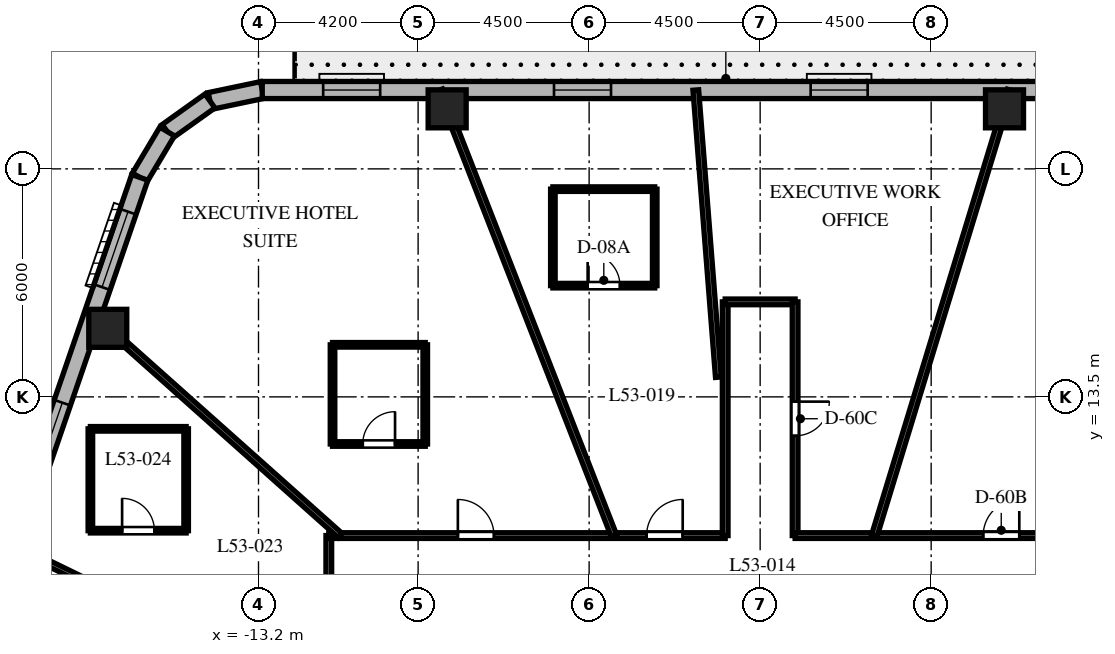
"""IFC4 building model, lengths in metres.
Left out: names, types, materials, properties, quantities, classifications, styles, units other than length and angle.
Written with IfcOpenShell. Run it as: python <this file> out.ifc"""

import sys

from ifc_helpers import new_model, si_unit, direction, frame, frame_2d, origin, origin_2d, place, context, subcontext, project, spatial, rectangle, extrude, element, fill, save


model = new_model("IFC4")
c1 = context("Model", 3, precision=1e-05, world=origin(), true_north=direction((0.0, 1.0)))
c2 = subcontext(c1, "Body", "Model", "MODEL_VIEW")
j1 = project(units=[si_unit("LENGTHUNIT", "METRE"), si_unit("PLANEANGLEUNIT", "RADIAN")], contexts=[c1])
p1 = place(None, origin())
s1 = spatial("IfcSite", under=j1, at=p1, CompositionType="ELEMENT")
p2 = place(p1, origin())
s2 = spatial("IfcBuilding", under=s1, at=p2, CompositionType="ELEMENT")
p3 = place(p2, frame((0.0, 0.0, 214.1)))
s3 = spatial("IfcBuildingStorey", under=s2, at=p3, CompositionType="ELEMENT", Elevation=214.1)
for number, where, z_axis, x_axis in (
    (1, (6.43, 21.08, 0.0), (0.0, 0.0, 1.0), (1.0, 0.0, 0.0)),
    (2, (-8.236, 21.08, 0.0), (0.0, 0.0, 1.0), (1.0, 0.0, 0.0)),
    (3, (-17.166, 15.304, 0.0), (0.0, 0.0, 1.0), (1.0, 0.0, 0.0)),
):
    element("IfcColumn", number, at=place(p3, frame(where, z_axis=z_axis, x_axis=x_axis)), inside=s3, PredefinedType="COLUMN", context=c2, shape_type="SweptSolid", body=[
        extrude(rectangle(XDim=1.0, YDim=1.0, at=origin_2d()), origin(), (0.0, 0.0, 1.0), 3.8),
    ])
p4 = place(p3, frame((-13.102, 21.575, 0.0), z_axis=(0.0, 0.0, 1.0), x_axis=(-0.978757421505, -0.205021730188, 0.0)))
e4 = element("IfcWall", 4, at=p4, inside=s3, PredefinedType="SOLIDWALL", context=c2, shape_type="SweptSolid", body=[
    extrude(rectangle(XDim=1.406, YDim=0.45, at=frame_2d((0.703, 0.0))), origin(), (0.0, 0.0, 1.0), 3.5),
])
p5 = place(p3, frame((-14.478, 21.287, 0.0), z_axis=(0.0, 0.0, 1.0), x_axis=(-0.813888518617, -0.58102106611, 0.0)))
e5 = element("IfcWall", 5, at=p5, inside=s3, PredefinedType="SOLIDWALL", context=c2, shape_type="SweptSolid", body=[
    extrude(rectangle(XDim=1.383, YDim=0.45, at=frame_2d((0.691, 0.0))), origin(), (0.0, 0.0, 1.0), 3.5),
])
p6 = place(p3, frame((-15.604, 20.483, 0.0), z_axis=(0.0, 0.0, 1.0), x_axis=(-0.512222149036, -0.858852996756, 0.0)))
e6 = element("IfcWall", 6, at=p6, inside=s3, PredefinedType="SOLIDWALL", context=c2, shape_type="SweptSolid", body=[
    extrude(rectangle(XDim=1.406, YDim=0.45, at=frame_2d((0.703, 0.0))), origin(), (0.0, 0.0, 1.0), 3.5),
])
p7 = place(p3, frame((11.298, 21.575, 0.0), z_axis=(0.0, 0.0, 1.0), x_axis=(-1.0, 0.0, 0.0)))
e7 = element("IfcWall", 7, at=p7, inside=s3, PredefinedType="SOLIDWALL", context=c2, shape_type="SweptSolid", body=[
    extrude(rectangle(XDim=24.399, YDim=0.45, at=frame_2d((12.2, 0.0))), origin(), (0.0, 0.0, 1.0), 3.5),
])
p8 = place(p7, frame((2.55, 0.0, 0.0)))
e8 = element("IfcOpeningElement", 8, at=p8, cuts=e7, PredefinedType="OPENING", context=c2, shape_type="SweptSolid", body=[
    extrude(rectangle(XDim=0.95, YDim=2.15, at=frame_2d((0.475, 1.075))), frame((0.0, 0.235, 0.0), z_axis=(0.0, -1.0, 0.0), x_axis=(1.0, 0.0, 0.0)), (0.0, 0.0, 1.0), 0.47),
])
p9 = place(p7, frame((8.469, 0.0, 0.8)))
e9 = element("IfcOpeningElement", 9, at=p9, cuts=e7, PredefinedType="OPENING", context=c2, shape_type="SweptSolid", body=[
    extrude(rectangle(XDim=1.5, YDim=1.8, at=frame_2d((0.75, 0.9))), frame((0.0, 0.235, 0.0), z_axis=(0.0, -1.0, 0.0), x_axis=(1.0, 0.0, 0.0)), (0.0, 0.0, 1.0), 0.47),
])
p10 = place(p7, frame((15.222, 0.0, 0.8)))
e10 = element("IfcOpeningElement", 10, at=p10, cuts=e7, PredefinedType="OPENING", context=c2, shape_type="SweptSolid", body=[
    extrude(rectangle(XDim=1.5, YDim=1.8, at=frame_2d((0.75, 0.9))), frame((0.0, 0.235, 0.0), z_axis=(0.0, -1.0, 0.0), x_axis=(1.0, 0.0, 0.0)), (0.0, 0.0, 1.0), 0.47),
])
p11 = place(p7, frame((21.296, 0.0, 0.8)))
e11 = element("IfcOpeningElement", 11, at=p11, cuts=e7, PredefinedType="OPENING", context=c2, shape_type="SweptSolid", body=[
    extrude(rectangle(XDim=1.5, YDim=1.8, at=frame_2d((0.75, 0.9))), frame((0.0, 0.235, 0.0), z_axis=(0.0, -1.0, 0.0), x_axis=(1.0, 0.0, 0.0)), (0.0, 0.0, 1.0), 0.47),
])
p12 = place(p3, frame((-16.324, 19.275, 0.0), z_axis=(0.0, 0.0, 1.0), x_axis=(-0.325083142304, -0.945685439557, 0.0)))
e12 = element("IfcWall", 12, at=p12, inside=s3, PredefinedType="SOLIDWALL", context=c2, shape_type="SweptSolid", body=[
    extrude(rectangle(XDim=20.224, YDim=0.45, at=frame_2d((10.112, 0.0))), origin(), (0.0, 0.0, 1.0), 3.5),
])
p13 = place(p12, frame((0.953, 0.0, 0.8)))
e13 = element("IfcOpeningElement", 13, at=p13, cuts=e12, PredefinedType="OPENING", context=c2, shape_type="SweptSolid", body=[
    extrude(rectangle(XDim=2.1, YDim=1.85, at=frame_2d((1.05, 0.925))), frame((0.0, 0.235, 0.0), z_axis=(0.0, -1.0, 0.0), x_axis=(1.0, 0.0, 0.0)), (0.0, 0.0, 1.0), 0.47),
])
p14 = place(p12, frame((6.268, 0.0, 0.8)))
e14 = element("IfcOpeningElement", 14, at=p14, cuts=e12, PredefinedType="OPENING", context=c2, shape_type="SweptSolid", body=[
    extrude(rectangle(XDim=2.1, YDim=1.85, at=frame_2d((1.05, 0.925))), frame((0.0, 0.235, 0.0), z_axis=(0.0, -1.0, 0.0), x_axis=(1.0, 0.0, 0.0)), (0.0, 0.0, 1.0), 0.47),
])
p15 = place(p12, frame((11.95, 0.0, 0.8)))
e15 = element("IfcOpeningElement", 15, at=p15, cuts=e12, PredefinedType="OPENING", context=c2, shape_type="SweptSolid", body=[
    extrude(rectangle(XDim=2.1, YDim=1.85, at=frame_2d((1.05, 0.925))), frame((0.0, 0.235, 0.0), z_axis=(0.0, -1.0, 0.0), x_axis=(1.0, 0.0, 0.0)), (0.0, 0.0, 1.0), 0.47),
])
p16 = place(p12, frame((17.118, 0.0, 0.8)))
e16 = element("IfcOpeningElement", 16, at=p16, cuts=e12, PredefinedType="OPENING", context=c2, shape_type="SweptSolid", body=[
    extrude(rectangle(XDim=2.1, YDim=1.85, at=frame_2d((1.05, 0.925))), frame((0.0, 0.235, 0.0), z_axis=(0.0, -1.0, 0.0), x_axis=(1.0, 0.0, 0.0)), (0.0, 0.0, 1.0), 0.47),
])
p17 = place(p3, frame((-11.35, 4.4, 0.0), z_axis=(0.0, 0.0, 1.0), x_axis=(0.0, 1.0, 0.0)))
e17 = element("IfcWall", 17, at=p17, inside=s3, PredefinedType="PARTITIONING", context=c2, shape_type="SweptSolid", body=[
    extrude(rectangle(XDim=5.45, YDim=0.15, at=frame_2d((2.725, 0.0))), origin(), (0.0, 0.0, 1.0), 2.99),
])
p18 = place(p17, frame((2.694, 0.0, 0.0)))
e18 = element("IfcOpeningElement", 18, at=p18, cuts=e17, PredefinedType="OPENING", context=c2, shape_type="SweptSolid", body=[
    extrude(rectangle(XDim=0.95, YDim=2.03, at=frame_2d((0.475, 1.015))), frame((0.0, 0.085, 0.0), z_axis=(0.0, -1.0, 0.0), x_axis=(1.0, 0.0, 0.0)), (0.0, 0.0, 1.0), 0.17),
])
p19 = place(p3, frame((-11.35, 9.85, 0.0), z_axis=(0.0, 0.0, 1.0), x_axis=(1.0, 0.0, 0.0)))
e19 = element("IfcWall", 19, at=p19, inside=s3, PredefinedType="PARTITIONING", context=c2, shape_type="SweptSolid", body=[
    extrude(rectangle(XDim=10.43, YDim=0.15, at=frame_2d((5.215, 0.0))), origin(), (0.0, 0.0, 1.0), 2.99),
])
p20 = place(p19, frame((8.362, 0.0, 0.0)))
e20 = element("IfcOpeningElement", 20, at=p20, cuts=e19, PredefinedType="OPENING", context=c2, shape_type="SweptSolid", body=[
    extrude(rectangle(XDim=0.95, YDim=2.03, at=frame_2d((0.475, 1.015))), frame((0.0, 0.085, 0.0), z_axis=(0.0, -1.0, 0.0), x_axis=(1.0, 0.0, 0.0)), (0.0, 0.0, 1.0), 0.17),
])
p21 = place(p19, frame((3.396, 0.0, 0.0)))
e21 = element("IfcOpeningElement", 21, at=p21, cuts=e19, PredefinedType="OPENING", context=c2, shape_type="SweptSolid", body=[
    extrude(rectangle(XDim=0.95, YDim=2.03, at=frame_2d((0.475, 1.015))), frame((0.0, 0.085, 0.0), z_axis=(0.0, -1.0, 0.0), x_axis=(1.0, 0.0, 0.0)), (0.0, 0.0, 1.0), 0.17),
])
p22 = place(p3, frame((-0.92, 9.85, 0.0), z_axis=(0.0, 0.0, 1.0), x_axis=(0.0, 1.0, 0.0)))
e22 = element("IfcWall", 22, at=p22, inside=s3, PredefinedType="PARTITIONING", context=c2, shape_type="SweptSolid", body=[
    extrude(rectangle(XDim=6.15, YDim=0.15, at=frame_2d((3.075, 0.0))), origin(), (0.0, 0.0, 1.0), 3.026),
])
p23 = place(p3, frame((-0.92, 16.0, 0.0), z_axis=(0.0, 0.0, 1.0), x_axis=(1.0, 0.0, 0.0)))
e23 = element("IfcWall", 23, at=p23, inside=s3, PredefinedType="PARTITIONING", context=c2, shape_type="SweptSolid", body=[
    extrude(rectangle(XDim=1.84, YDim=0.15, at=frame_2d((0.92, 0.0))), origin(), (0.0, 0.0, 1.0), 3.5),
])
p24 = place(p3, frame((0.92, 16.0, 0.0), z_axis=(0.0, 0.0, 1.0), x_axis=(0.0, -1.0, 0.0)))
e24 = element("IfcWall", 24, at=p24, inside=s3, PredefinedType="PARTITIONING", context=c2, shape_type="SweptSolid", body=[
    extrude(rectangle(XDim=6.15, YDim=0.15, at=frame_2d((3.075, 0.0))), origin(), (0.0, 0.0, 1.0), 3.026),
])
p25 = place(p24, frame((2.625, 0.0, 0.0)))
e25 = element("IfcOpeningElement", 25, at=p25, cuts=e24, PredefinedType="OPENING", context=c2, shape_type="SweptSolid", body=[
    extrude(rectangle(XDim=0.9, YDim=2.03, at=frame_2d((0.45, 1.015))), frame((0.0, 0.085, 0.0), z_axis=(0.0, -1.0, 0.0), x_axis=(1.0, 0.0, 0.0)), (0.0, 0.0, 1.0), 0.17),
])
p26 = place(p3, frame((0.92, 9.85, 0.0), z_axis=(0.0, 0.0, 1.0), x_axis=(1.0, 0.0, 0.0)))
e26 = element("IfcWall", 26, at=p26, inside=s3, PredefinedType="PARTITIONING", context=c2, shape_type="SweptSolid", body=[
    extrude(rectangle(XDim=10.43, YDim=0.15, at=frame_2d((5.215, 0.0))), origin(), (0.0, 0.0, 1.0), 2.99),
])
p27 = place(p26, frame((4.949, 0.0, 0.0)))
e27 = element("IfcOpeningElement", 27, at=p27, cuts=e26, PredefinedType="OPENING", context=c2, shape_type="SweptSolid", body=[
    extrude(rectangle(XDim=0.95, YDim=2.03, at=frame_2d((0.475, 1.015))), frame((0.0, 0.085, 0.0), z_axis=(0.0, -1.0, 0.0), x_axis=(1.0, 0.0, 0.0)), (0.0, 0.0, 1.0), 0.17),
])
p28 = place(p3, frame((3.004, 9.85, 0.0), z_axis=(0.0, 0.0, 1.0), x_axis=(0.291775760688, 0.956486751333, 0.0)))
e28 = element("IfcWall", 28, at=p28, inside=s3, PredefinedType="PARTITIONING", context=c2, shape_type="SweptSolid", body=[
    extrude(rectangle(XDim=12.258, YDim=0.15, at=frame_2d((6.129, 0.0))), origin(), (0.0, 0.0, 1.0), 2.74),
])
p29 = place(p3, frame((-1.1, 14.018, 0.0), z_axis=(0.0, 0.0, 1.0), x_axis=(-0.078228275349, 0.996935472804, 0.0)))
e29 = element("IfcWall", 29, at=p29, inside=s3, PredefinedType="PARTITIONING", context=c2, shape_type="SweptSolid", body=[
    extrude(rectangle(XDim=7.581, YDim=0.15, at=frame_2d((3.79, 0.0))), origin(), (0.0, 0.0, 1.0), 2.74),
])
p30 = place(p3, frame((-3.848, 9.85, 0.0), z_axis=(0.0, 0.0, 1.0), x_axis=(-0.363921778212, 0.931429513889, 0.0)))
e30 = element("IfcWall", 30, at=p30, inside=s3, PredefinedType="PARTITIONING", context=c2, shape_type="SweptSolid", body=[
    extrude(rectangle(XDim=12.588, YDim=0.15, at=frame_2d((6.294, 0.0))), origin(), (0.0, 0.0, 1.0), 2.74),
])
p31 = place(p3, frame((-11.048, 9.85, 0.0), z_axis=(0.0, 0.0, 1.0), x_axis=(-0.746444434655, 0.665447748492, 0.0)))
e31 = element("IfcWall", 31, at=p31, inside=s3, PredefinedType="PARTITIONING", context=c2, shape_type="SweptSolid", body=[
    extrude(rectangle(XDim=8.732, YDim=0.15, at=frame_2d((4.366, 0.0))), origin(), (0.0, 0.0, 1.0), 2.74),
])
p32 = place(p3, frame((-11.35, 5.528, 0.0), z_axis=(0.0, 0.0, 1.0), x_axis=(-0.899038669565, 0.437869239188, 0.0)))
e32 = element("IfcWall", 32, at=p32, inside=s3, PredefinedType="PARTITIONING", context=c2, shape_type="SweptSolid", body=[
    extrude(rectangle(XDim=9.242, YDim=0.15, at=frame_2d((4.621, 0.0))), origin(), (0.0, 0.0, 1.0), 2.74),
])
p33 = place(p3, frame((-5.454, 16.427, 0.0), z_axis=(0.0, 0.0, 1.0), x_axis=(1.0, 0.0, 0.0)))
e33 = element("IfcWall", 33, at=p33, inside=s3, PredefinedType="PARTITIONING", context=c2, shape_type="SweptSolid", body=[
    extrude(rectangle(XDim=2.68, YDim=0.12, at=frame_2d((1.34, 0.0))), origin(), (0.0, 0.0, 1.0), 3.5),
])
p34 = place(p33, frame((0.915, 0.0, 0.0)))
e34 = element("IfcOpeningElement", 34, at=p34, cuts=e33, PredefinedType="OPENING", context=c2, shape_type="SweptSolid", body=[
    extrude(rectangle(XDim=0.85, YDim=2.03, at=frame_2d((0.425, 1.015))), frame((0.0, 0.07, 0.0), z_axis=(0.0, -1.0, 0.0), x_axis=(1.0, 0.0, 0.0)), (0.0, 0.0, 1.0), 0.14),
])
p35 = place(p3, frame((-2.774, 16.427, 0.0), z_axis=(0.0, 0.0, 1.0), x_axis=(0.0, 1.0, 0.0)))
e35 = element("IfcWall", 35, at=p35, inside=s3, PredefinedType="PARTITIONING", context=c2, shape_type="SweptSolid", body=[
    extrude(rectangle(XDim=2.54, YDim=0.12, at=frame_2d((1.27, 0.0))), origin(), (0.0, 0.0, 1.0), 2.94),
])
p36 = place(p3, frame((-2.774, 18.967, 0.0), z_axis=(0.0, 0.0, 1.0), x_axis=(-1.0, 0.0, 0.0)))
e36 = element("IfcWall", 36, at=p36, inside=s3, PredefinedType="PARTITIONING", context=c2, shape_type="SweptSolid", body=[
    extrude(rectangle(XDim=2.68, YDim=0.12, at=frame_2d((1.34, 0.0))), origin(), (0.0, 0.0, 1.0), 3.5),
])
p37 = place(p3, frame((-5.454, 18.967, 0.0), z_axis=(0.0, 0.0, 1.0), x_axis=(0.0, -1.0, 0.0)))
e37 = element("IfcWall", 37, at=p37, inside=s3, PredefinedType="PARTITIONING", context=c2, shape_type="SweptSolid", body=[
    extrude(rectangle(XDim=2.54, YDim=0.12, at=frame_2d((1.27, 0.0))), origin(), (0.0, 0.0, 1.0), 2.94),
])
p38 = place(p3, frame((-11.252, 12.26, 0.0), z_axis=(0.0, 0.0, 1.0), x_axis=(1.0, 0.0, 0.0)))
e38 = element("IfcWall", 38, at=p38, inside=s3, PredefinedType="PARTITIONING", context=c2, shape_type="SweptSolid", body=[
    extrude(rectangle(XDim=2.44, YDim=0.12, at=frame_2d((1.22, 0.0))), origin(), (0.0, 0.0, 1.0), 3.072),
])
p39 = place(p38, frame((0.795, 0.0, 0.0)))
e39 = element("IfcOpeningElement", 39, at=p39, cuts=e38, PredefinedType="OPENING", context=c2, shape_type="SweptSolid", body=[
    extrude(rectangle(XDim=0.85, YDim=2.03, at=frame_2d((0.425, 1.015))), frame((0.0, 0.07, 0.0), z_axis=(0.0, -1.0, 0.0), x_axis=(1.0, 0.0, 0.0)), (0.0, 0.0, 1.0), 0.14),
])
p40 = place(p3, frame((-8.812, 12.26, 0.0), z_axis=(0.0, 0.0, 1.0), x_axis=(0.0, 1.0, 0.0)))
e40 = element("IfcWall", 40, at=p40, inside=s3, PredefinedType="PARTITIONING", context=c2, shape_type="SweptSolid", body=[
    extrude(rectangle(XDim=2.61, YDim=0.12, at=frame_2d((1.305, 0.0))), origin(), (0.0, 0.0, 1.0), 2.99),
])
p41 = place(p3, frame((-8.812, 14.87, 0.0), z_axis=(0.0, 0.0, 1.0), x_axis=(-1.0, 0.0, 0.0)))
e41 = element("IfcWall", 41, at=p41, inside=s3, PredefinedType="PARTITIONING", context=c2, shape_type="SweptSolid", body=[
    extrude(rectangle(XDim=2.44, YDim=0.12, at=frame_2d((1.22, 0.0))), origin(), (0.0, 0.0, 1.0), 3.026),
])
p42 = place(p3, frame((-11.252, 14.87, 0.0), z_axis=(0.0, 0.0, 1.0), x_axis=(0.0, -1.0, 0.0)))
e42 = element("IfcWall", 42, at=p42, inside=s3, PredefinedType="PARTITIONING", context=c2, shape_type="SweptSolid", body=[
    extrude(rectangle(XDim=2.61, YDim=0.12, at=frame_2d((1.305, 0.0))), origin(), (0.0, 0.0, 1.0), 3.026),
])
p43 = place(p3, frame((-17.624, 9.979, 0.0), z_axis=(0.0, 0.0, 1.0), x_axis=(1.0, 0.0, 0.0)))
e43 = element("IfcWall", 43, at=p43, inside=s3, PredefinedType="PARTITIONING", context=c2, shape_type="SweptSolid", body=[
    extrude(rectangle(XDim=2.52, YDim=0.12, at=frame_2d((1.26, 0.0))), origin(), (0.0, 0.0, 1.0), 3.072),
])
p44 = place(p43, frame((0.835, 0.0, 0.0)))
e44 = element("IfcOpeningElement", 44, at=p44, cuts=e43, PredefinedType="OPENING", context=c2, shape_type="SweptSolid", body=[
    extrude(rectangle(XDim=0.85, YDim=2.03, at=frame_2d((0.425, 1.015))), frame((0.0, 0.07, 0.0), z_axis=(0.0, -1.0, 0.0), x_axis=(1.0, 0.0, 0.0)), (0.0, 0.0, 1.0), 0.14),
])
p45 = place(p3, frame((-15.104, 9.979, 0.0), z_axis=(0.0, 0.0, 1.0), x_axis=(0.0, 1.0, 0.0)))
e45 = element("IfcWall", 45, at=p45, inside=s3, PredefinedType="PARTITIONING", context=c2, shape_type="SweptSolid", body=[
    extrude(rectangle(XDim=2.68, YDim=0.12, at=frame_2d((1.34, 0.0))), origin(), (0.0, 0.0, 1.0), 3.072),
])
p46 = place(p3, frame((-15.104, 12.659, 0.0), z_axis=(0.0, 0.0, 1.0), x_axis=(-1.0, 0.0, 0.0)))
e46 = element("IfcWall", 46, at=p46, inside=s3, PredefinedType="PARTITIONING", context=c2, shape_type="SweptSolid", body=[
    extrude(rectangle(XDim=2.52, YDim=0.12, at=frame_2d((1.26, 0.0))), origin(), (0.0, 0.0, 1.0), 3.5),
])
p47 = place(p3, frame((-17.624, 12.659, 0.0), z_axis=(0.0, 0.0, 1.0), x_axis=(0.0, -1.0, 0.0)))
e47 = element("IfcWall", 47, at=p47, inside=s3, PredefinedType="PARTITIONING", context=c2, shape_type="SweptSolid", body=[
    extrude(rectangle(XDim=2.68, YDim=0.12, at=frame_2d((1.34, 0.0))), origin(), (0.0, 0.0, 1.0), 3.5),
])
p48 = place(p9, origin())
e48 = element("IfcWindow", 48, at=p48, inside=s3, PartitioningType="SINGLE_PANEL", PredefinedType="WINDOW", context=c2, shape_type="SweptSolid", body=[
    extrude(rectangle(XDim=1.5, YDim=1.8, at=frame_2d((0.75, 0.9))), frame((0.0, 0.03, 0.0), z_axis=(0.0, -1.0, 0.0), x_axis=(1.0, 0.0, 0.0)), (0.0, 0.0, 1.0), 0.06),
])
fill(e9, e48)
p49 = place(p10, origin())
e49 = element("IfcWindow", 49, at=p49, inside=s3, PartitioningType="SINGLE_PANEL", PredefinedType="WINDOW", context=c2, shape_type="SweptSolid", body=[
    extrude(rectangle(XDim=1.5, YDim=1.8, at=frame_2d((0.75, 0.9))), frame((0.0, 0.03, 0.0), z_axis=(0.0, -1.0, 0.0), x_axis=(1.0, 0.0, 0.0)), (0.0, 0.0, 1.0), 0.06),
])
fill(e10, e49)
p50 = place(p11, origin())
e50 = element("IfcWindow", 50, at=p50, inside=s3, PartitioningType="SINGLE_PANEL", PredefinedType="WINDOW", context=c2, shape_type="SweptSolid", body=[
    extrude(rectangle(XDim=1.5, YDim=1.8, at=frame_2d((0.75, 0.9))), frame((0.0, 0.03, 0.0), z_axis=(0.0, -1.0, 0.0), x_axis=(1.0, 0.0, 0.0)), (0.0, 0.0, 1.0), 0.06),
])
fill(e11, e50)
p51 = place(p13, origin())
e51 = element("IfcWindow", 51, at=p51, inside=s3, PartitioningType="SINGLE_PANEL", PredefinedType="WINDOW", context=c2, shape_type="SweptSolid", body=[
    extrude(rectangle(XDim=2.1, YDim=1.85, at=frame_2d((1.05, 0.925))), frame((0.0, 0.03, 0.0), z_axis=(0.0, -1.0, 0.0), x_axis=(1.0, 0.0, 0.0)), (0.0, 0.0, 1.0), 0.06),
])
fill(e13, e51)
p52 = place(p14, origin())
e52 = element("IfcWindow", 52, at=p52, inside=s3, PartitioningType="SINGLE_PANEL", PredefinedType="WINDOW", context=c2, shape_type="SweptSolid", body=[
    extrude(rectangle(XDim=2.1, YDim=1.85, at=frame_2d((1.05, 0.925))), frame((0.0, 0.03, 0.0), z_axis=(0.0, -1.0, 0.0), x_axis=(1.0, 0.0, 0.0)), (0.0, 0.0, 1.0), 0.06),
])
fill(e14, e52)
p53 = place(p27, origin())
e53 = element("IfcDoor", 53, at=p53, inside=s3, OperationType="SINGLE_SWING_RIGHT", PredefinedType="DOOR", context=c2, shape_type="SweptSolid", body=[
    extrude(rectangle(XDim=0.95, YDim=2.03, at=frame_2d((0.475, 1.015))), frame((0.0, 0.025, 0.0), z_axis=(0.0, -1.0, 0.0), x_axis=(1.0, 0.0, 0.0)), (0.0, 0.0, 1.0), 0.05),
])
fill(e27, e53)
p54 = place(p25, origin())
e54 = element("IfcDoor", 54, at=p54, inside=s3, OperationType="SINGLE_SWING_LEFT", PredefinedType="DOOR", context=c2, shape_type="SweptSolid", body=[
    extrude(rectangle(XDim=0.9, YDim=2.03, at=frame_2d((0.45, 1.015))), frame((0.0, 0.025, 0.0), z_axis=(0.0, -1.0, 0.0), x_axis=(1.0, 0.0, 0.0)), (0.0, 0.0, 1.0), 0.05),
])
fill(e25, e54)
p55 = place(p20, origin())
e55 = element("IfcDoor", 55, at=p55, inside=s3, OperationType="SINGLE_SWING_RIGHT", PredefinedType="DOOR", context=c2, shape_type="SweptSolid", body=[
    extrude(rectangle(XDim=0.95, YDim=2.03, at=frame_2d((0.475, 1.015))), frame((0.0, 0.025, 0.0), z_axis=(0.0, -1.0, 0.0), x_axis=(1.0, 0.0, 0.0)), (0.0, 0.0, 1.0), 0.05),
])
fill(e20, e55)
p56 = place(p34, origin())
e56 = element("IfcDoor", 56, at=p56, inside=s3, OperationType="SINGLE_SWING_LEFT", PredefinedType="DOOR", context=c2, shape_type="SweptSolid", body=[
    extrude(rectangle(XDim=0.85, YDim=2.03, at=frame_2d((0.425, 1.015))), frame((0.0, 0.025, 0.0), z_axis=(0.0, -1.0, 0.0), x_axis=(1.0, 0.0, 0.0)), (0.0, 0.0, 1.0), 0.05),
])
fill(e34, e56)
p57 = place(p21, origin())
e57 = element("IfcDoor", 57, at=p57, inside=s3, OperationType="SINGLE_SWING_LEFT", PredefinedType="DOOR", context=c2, shape_type="SweptSolid", body=[
    extrude(rectangle(XDim=0.95, YDim=2.03, at=frame_2d((0.475, 1.015))), frame((0.0, 0.025, 0.0), z_axis=(0.0, -1.0, 0.0), x_axis=(1.0, 0.0, 0.0)), (0.0, 0.0, 1.0), 0.05),
])
fill(e21, e57)
p58 = place(p39, origin())
e58 = element("IfcDoor", 58, at=p58, inside=s3, OperationType="SINGLE_SWING_RIGHT", PredefinedType="DOOR", context=c2, shape_type="SweptSolid", body=[
    extrude(rectangle(XDim=0.85, YDim=2.03, at=frame_2d((0.425, 1.015))), frame((0.0, 0.025, 0.0), z_axis=(0.0, -1.0, 0.0), x_axis=(1.0, 0.0, 0.0)), (0.0, 0.0, 1.0), 0.05),
])
fill(e39, e58)
p59 = place(p44, origin())
e59 = element("IfcDoor", 59, at=p59, inside=s3, OperationType="SINGLE_SWING_LEFT", PredefinedType="DOOR", context=c2, shape_type="SweptSolid", body=[
    extrude(rectangle(XDim=0.85, YDim=2.03, at=frame_2d((0.425, 1.015))), frame((0.0, 0.025, 0.0), z_axis=(0.0, -1.0, 0.0), x_axis=(1.0, 0.0, 0.0)), (0.0, 0.0, 1.0), 0.05),
])
fill(e44, e59)
save(model, sys.argv[1])
